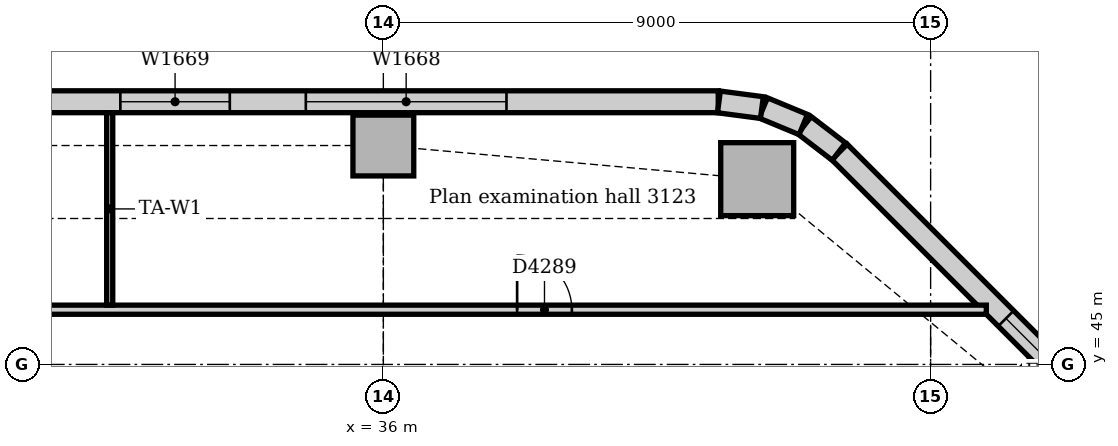
"""IFC4 building model, lengths in metres.
Left out: names, types, materials, properties, quantities, classifications, styles, units other than length and angle.
Written with IfcOpenShell. Run it as: python <this file> out.ifc"""

import sys

from ifc_helpers import new_model, si_unit, direction, frame, frame_2d, origin, origin_2d, place, context, subcontext, project, spatial, rectangle, extrude, element, fill, save


model = new_model("IFC4")
c1 = context("Model", 3, precision=1e-05, world=origin(), true_north=direction((0.0, 1.0)))
c2 = subcontext(c1, "Body", "Model", "MODEL_VIEW")
j1 = project(units=[si_unit("LENGTHUNIT", "METRE"), si_unit("PLANEANGLEUNIT", "RADIAN")], contexts=[c1])
p1 = place(None, origin())
s1 = spatial("IfcSite", under=j1, at=p1, CompositionType="ELEMENT")
p2 = place(p1, origin())
s2 = spatial("IfcBuilding", under=s1, at=p2, CompositionType="ELEMENT")
p3 = place(p2, frame((0.0, 0.0, 132.0)))
s3 = spatial("IfcBuildingStorey", under=s2, at=p3, CompositionType="ELEMENT", Elevation=132.0)
p4 = place(p3, frame((42.148, 48.047, 0.0), z_axis=(0.0, 0.0, 1.0), x_axis=(1.0, 0.0, 0.0)))
e1 = element("IfcColumn", 1, at=p4, inside=s3, PredefinedType="COLUMN", context=c2, shape_type="SweptSolid", body=[
    extrude(rectangle(XDim=1.2, YDim=1.2, at=origin_2d()), origin(), (0.0, 0.0, 1.0), 3.85),
])
for number, where, z_axis, x_axis in (
    (2, (46.614, 44.364, 0.0), (0.0, 0.0, 1.0), (0.707, 0.707, 0.0)),
    (3, (36.0, 48.6, 0.0), (0.0, 0.0, 1.0), (1.0, 0.0, 0.0)),
):
    element("IfcColumn", number, at=place(p3, frame(where, z_axis=z_axis, x_axis=x_axis)), inside=s3, PredefinedType="COLUMN", context=c2, shape_type="SweptSolid", body=[
        extrude(rectangle(XDim=1.0, YDim=1.0, at=origin_2d()), origin(), (0.0, 0.0, 1.0), 3.85),
    ])
p5 = place(p3, frame((50.744, 41.251, 0.0), z_axis=(0.0, 0.0, 1.0), x_axis=(-0.707106781187, 0.707106781187, 0.0)))
e4 = element("IfcWall", 4, at=p5, inside=s3, PredefinedType="STANDARD", context=c2, shape_type="SweptSolid", body=[
    extrude(rectangle(XDim=10.243, YDim=0.36, at=frame_2d((5.121, 0.0))), origin(), (0.0, 0.0, 1.0), 3.85),
])
p6 = place(p5, frame((3.071, 0.0, 0.9)))
e5 = element("IfcOpeningElement", 5, at=p6, cuts=e4, PredefinedType="OPENING", context=c2, shape_type="SweptSolid", body=[
    extrude(rectangle(XDim=3.3, YDim=1.6, at=frame_2d((1.65, 0.8))), frame((0.0, 0.19, 0.0), z_axis=(0.0, -1.0, 0.0), x_axis=(1.0, 0.0, 0.0)), (0.0, 0.0, 1.0), 0.38),
])
p7 = place(p3, frame((41.507, 49.32, 0.0), z_axis=(0.0, 0.0, 1.0), x_axis=(-1.0, 0.0, 0.0)))
e6 = element("IfcWall", 6, at=p7, inside=s3, PredefinedType="STANDARD", context=c2, shape_type="SweptSolid", body=[
    extrude(rectangle(XDim=37.265, YDim=0.36, at=frame_2d((18.632, 0.0))), origin(), (0.0, 0.0, 1.0), 3.85),
])
p8 = place(p7, frame((3.482, 0.0, 0.9)))
e7 = element("IfcOpeningElement", 7, at=p8, cuts=e6, PredefinedType="OPENING", context=c2, shape_type="SweptSolid", body=[
    extrude(rectangle(XDim=3.3, YDim=1.6, at=frame_2d((1.65, 0.8))), frame((0.0, 0.19, 0.0), z_axis=(0.0, -1.0, 0.0), x_axis=(1.0, 0.0, 0.0)), (0.0, 0.0, 1.0), 0.38),
])
p9 = place(p7, frame((8.032, 0.0, 0.9)))
e8 = element("IfcOpeningElement", 8, at=p9, cuts=e6, PredefinedType="OPENING", context=c2, shape_type="SweptSolid", body=[
    extrude(rectangle(XDim=1.8, YDim=1.6, at=frame_2d((0.9, 0.8))), frame((0.0, 0.19, 0.0), z_axis=(0.0, -1.0, 0.0), x_axis=(1.0, 0.0, 0.0)), (0.0, 0.0, 1.0), 0.38),
])
p10 = place(p7, frame((12.482, 0.0, 0.9)))
e9 = element("IfcOpeningElement", 9, at=p10, cuts=e6, PredefinedType="OPENING", context=c2, shape_type="SweptSolid", body=[
    extrude(rectangle(XDim=3.3, YDim=1.6, at=frame_2d((1.65, 0.8))), frame((0.0, 0.19, 0.0), z_axis=(0.0, -1.0, 0.0), x_axis=(1.0, 0.0, 0.0)), (0.0, 0.0, 1.0), 0.38),
])
p11 = place(p7, frame((16.982, 0.0, 0.9)))
e10 = element("IfcOpeningElement", 10, at=p11, cuts=e6, PredefinedType="OPENING", context=c2, shape_type="SweptSolid", body=[
    extrude(rectangle(XDim=3.3, YDim=1.6, at=frame_2d((1.65, 0.8))), frame((0.0, 0.19, 0.0), z_axis=(0.0, -1.0, 0.0), x_axis=(1.0, 0.0, 0.0)), (0.0, 0.0, 1.0), 0.38),
])
p12 = place(p7, frame((21.482, 0.0, 0.9)))
e11 = element("IfcOpeningElement", 11, at=p12, cuts=e6, PredefinedType="OPENING", context=c2, shape_type="SweptSolid", body=[
    extrude(rectangle(XDim=3.3, YDim=1.6, at=frame_2d((1.65, 0.8))), frame((0.0, 0.19, 0.0), z_axis=(0.0, -1.0, 0.0), x_axis=(1.0, 0.0, 0.0)), (0.0, 0.0, 1.0), 0.38),
])
p13 = place(p7, frame((26.032, 0.0, 0.9)))
e12 = element("IfcOpeningElement", 12, at=p13, cuts=e6, PredefinedType="OPENING", context=c2, shape_type="SweptSolid", body=[
    extrude(rectangle(XDim=1.8, YDim=1.6, at=frame_2d((0.9, 0.8))), frame((0.0, 0.19, 0.0), z_axis=(0.0, -1.0, 0.0), x_axis=(1.0, 0.0, 0.0)), (0.0, 0.0, 1.0), 0.38),
])
p14 = place(p7, frame((30.482, 0.0, 0.9)))
e13 = element("IfcOpeningElement", 13, at=p14, cuts=e6, PredefinedType="OPENING", context=c2, shape_type="SweptSolid", body=[
    extrude(rectangle(XDim=3.3, YDim=1.6, at=frame_2d((1.65, 0.8))), frame((0.0, 0.19, 0.0), z_axis=(0.0, -1.0, 0.0), x_axis=(1.0, 0.0, 0.0)), (0.0, 0.0, 1.0), 0.38),
])
p15 = place(p3, frame((43.491, 48.5, 0.0), z_axis=(0.0, 0.0, 1.0), x_axis=(-0.793321924995, 0.608802368033, 0.0)))
e14 = element("IfcWall", 14, at=p15, inside=s3, PredefinedType="STANDARD", context=c2, shape_type="SweptSolid", body=[
    extrude(rectangle(XDim=0.713, YDim=0.36, at=frame_2d((0.357, 0.0))), origin(), (0.0, 0.0, 1.0), 3.85),
])
for number, where, z_axis, x_axis in (
    (15, (42.906, 48.945, 0.0), (0.0, 0.0, 1.0), (-0.924, 0.383, 0.0)),
    (16, (42.226, 49.224, 0.0), (0.0, 0.0, 1.0), (-0.991, 0.131, 0.0)),
):
    element("IfcWall", number, at=place(p3, frame(where, z_axis=z_axis, x_axis=x_axis)), inside=s3, PredefinedType="STANDARD", context=c2, shape_type="SweptSolid", body=[
        extrude(rectangle(XDim=0.713, YDim=0.36, at=frame_2d((0.356, 0.0))), origin(), (0.0, 0.0, 1.0), 3.85),
    ])
p16 = place(p3, frame((2.053, 45.9, 0.0), z_axis=(0.0, 0.0, 1.0), x_axis=(1.0, 0.0, 0.0)))
e17 = element("IfcWall", 17, at=p16, inside=s3, PredefinedType="PARTITIONING", context=c2, shape_type="SweptSolid", body=[
    extrude(rectangle(XDim=43.863, YDim=0.15, at=frame_2d((21.931, 0.0))), origin(), (0.0, 0.0, 1.0), 3.85),
])
p17 = place(p16, frame((5.35, 0.0, 0.0)))
e18 = element("IfcOpeningElement", 18, at=p17, cuts=e17, PredefinedType="OPENING", context=c2, shape_type="SweptSolid", body=[
    extrude(rectangle(XDim=0.9, YDim=2.1, at=frame_2d((0.45, 1.05))), frame((0.0, 0.085, 0.0), z_axis=(0.0, -1.0, 0.0), x_axis=(1.0, 0.0, 0.0)), (0.0, 0.0, 1.0), 0.17),
])
p18 = place(p16, frame((15.497, 0.0, 0.0)))
e19 = element("IfcOpeningElement", 19, at=p18, cuts=e17, PredefinedType="OPENING", context=c2, shape_type="SweptSolid", body=[
    extrude(rectangle(XDim=0.9, YDim=2.1, at=frame_2d((0.45, 1.05))), frame((0.0, 0.085, 0.0), z_axis=(0.0, -1.0, 0.0), x_axis=(1.0, 0.0, 0.0)), (0.0, 0.0, 1.0), 0.17),
])
p19 = place(p16, frame((36.147, 0.0, 0.0)))
e20 = element("IfcOpeningElement", 20, at=p19, cuts=e17, PredefinedType="OPENING", context=c2, shape_type="SweptSolid", body=[
    extrude(rectangle(XDim=0.9, YDim=2.1, at=frame_2d((0.45, 1.05))), frame((0.0, 0.085, 0.0), z_axis=(0.0, -1.0, 0.0), x_axis=(1.0, 0.0, 0.0)), (0.0, 0.0, 1.0), 0.17),
])
p20 = place(p3, frame((31.5, 45.975, 0.0), z_axis=(0.0, 0.0, 1.0), x_axis=(0.0, 1.0, 0.0)))
e21 = element("IfcWall", 21, at=p20, inside=s3, PredefinedType="PARTITIONING", context=c2, shape_type="SweptSolid", body=[
    extrude(rectangle(XDim=3.165, YDim=0.1, at=frame_2d((1.583, 0.0))), origin(), (0.0, 0.0, 1.0), 3.85),
])
p21 = place(p6, origin())
e22 = element("IfcWindow", 22, at=p21, inside=s3, PartitioningType="SINGLE_PANEL", PredefinedType="WINDOW", context=c2, shape_type="SweptSolid", body=[
    extrude(rectangle(XDim=3.3, YDim=1.6, at=frame_2d((1.65, 0.8))), frame((0.0, 0.13, 0.0), z_axis=(0.0, -1.0, 0.0), x_axis=(1.0, 0.0, 0.0)), (0.0, 0.0, 1.0), 0.06),
])
fill(e5, e22)
p22 = place(p8, origin())
e23 = element("IfcWindow", 23, at=p22, inside=s3, PartitioningType="SINGLE_PANEL", PredefinedType="WINDOW", context=c2, shape_type="SweptSolid", body=[
    extrude(rectangle(XDim=3.3, YDim=1.6, at=frame_2d((1.65, 0.8))), frame((0.0, 0.13, 0.0), z_axis=(0.0, -1.0, 0.0), x_axis=(1.0, 0.0, 0.0)), (0.0, 0.0, 1.0), 0.06),
])
fill(e7, e23)
p23 = place(p9, origin())
e24 = element("IfcWindow", 24, at=p23, inside=s3, PartitioningType="SINGLE_PANEL", PredefinedType="WINDOW", context=c2, shape_type="SweptSolid", body=[
    extrude(rectangle(XDim=1.8, YDim=1.6, at=frame_2d((0.9, 0.8))), frame((0.0, 0.13, 0.0), z_axis=(0.0, -1.0, 0.0), x_axis=(1.0, 0.0, 0.0)), (0.0, 0.0, 1.0), 0.06),
])
fill(e8, e24)
p24 = place(p19, origin())
e25 = element("IfcDoor", 25, at=p24, inside=s3, OperationType="SINGLE_SWING_LEFT", PredefinedType="DOOR", context=c2, shape_type="SweptSolid", body=[
    extrude(rectangle(XDim=0.9, YDim=2.1, at=frame_2d((0.45, 1.05))), frame((0.0, 0.025, 0.0), z_axis=(0.0, -1.0, 0.0), x_axis=(1.0, 0.0, 0.0)), (0.0, 0.0, 1.0), 0.05),
])
fill(e20, e25)
save(model, sys.argv[1])
